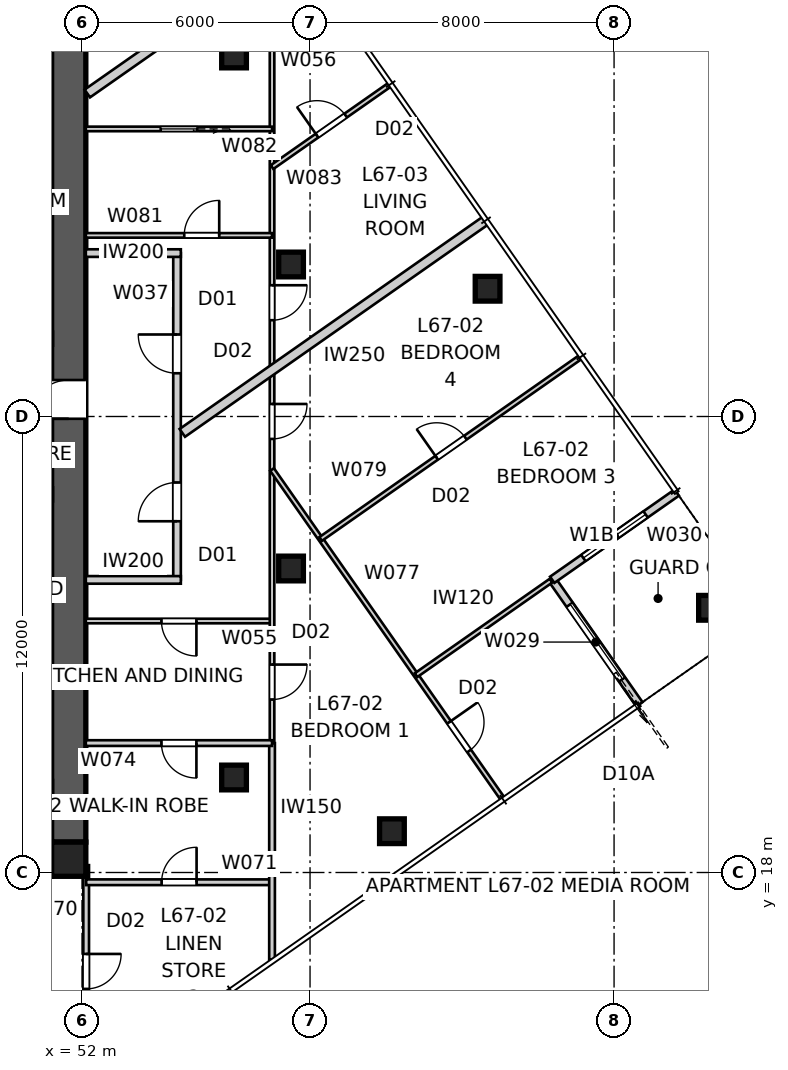
"""IFC4 building model, lengths in metres.
Left out: names, types, materials, properties, quantities, classifications, styles, units other than length and angle.
Written with IfcOpenShell. Run it as: python <this file> out.ifc"""

import sys

from ifc_helpers import new_model, si_unit, direction, frame, frame_2d, origin, origin_2d, place, context, subcontext, project, spatial, polyline, rectangle, outline, extrude, element, fill, save


model = new_model("IFC4")
c1 = context("Model", 3, precision=1e-05, world=origin(), true_north=direction((0.0, 1.0)))
c2 = subcontext(c1, "Body", "Model", "MODEL_VIEW")
j1 = project(units=[si_unit("LENGTHUNIT", "METRE"), si_unit("PLANEANGLEUNIT", "RADIAN")], contexts=[c1])
p1 = place(None, origin())
s1 = spatial("IfcSite", under=j1, at=p1, CompositionType="ELEMENT")
p2 = place(p1, origin())
s2 = spatial("IfcBuilding", under=s1, at=p2, CompositionType="ELEMENT")
p3 = place(p2, frame((0.0, 0.0, 243.8)))
s3 = spatial("IfcBuildingStorey", under=s2, at=p3, CompositionType="ELEMENT", Elevation=243.8)
p4 = place(p3, frame((51.2, 18.35, 0.0), z_axis=(0.0, 0.0, 1.0), x_axis=(-1.0, 0.0, 0.0)))
e1 = element("IfcWall", 1, at=p4, inside=s3, PredefinedType="SHEAR", context=c2, shape_type="SweptSolid", body=[
    extrude(outline(polyline([(0.0, -0.45), (22.4, -0.45), (22.4, -0.025), (22.85, -0.025), (22.85, 0.025), (22.4, 0.025), (22.4, 0.45), (0.0, 0.45), (0.0, 0.025), (-0.45, 0.025), (-0.45, -0.025), (0.0, -0.025), (0.0, -0.45)])), origin(), (0.0, 0.0, 1.0), 3.4),
])
p5 = place(p3, frame((51.65, 18.8, 0.0), z_axis=(0.0, 0.0, 1.0), x_axis=(0.0, 1.0, 0.0)))
e2 = element("IfcWall", 2, at=p5, inside=s3, PredefinedType="SHEAR", context=c2, shape_type="SweptSolid", body=[
    extrude(outline(polyline([(0.0, -0.45), (22.4, -0.45), (22.4, -0.025), (22.85, -0.025), (22.85, 0.025), (22.4, 0.025), (22.4, 0.45), (0.0, 0.45), (0.0, 0.025), (-0.45, 0.025), (-0.45, -0.025), (0.0, -0.025), (0.0, -0.45)])), origin(), (0.0, 0.0, 1.0), 3.4),
])
p6 = place(p5, frame((11.14, 0.0, 0.0)))
e3 = element("IfcOpeningElement", 3, at=p6, cuts=e2, PredefinedType="OPENING", context=c2, shape_type="SweptSolid", body=[
    extrude(rectangle(XDim=1.02, YDim=2.4, at=frame_2d((0.51, 1.2))), frame((0.0, 0.46, 0.0), z_axis=(0.0, -1.0, 0.0), x_axis=(1.0, 0.0, 0.0)), (0.0, 0.0, 1.0), 0.92),
])
p7 = place(p3, frame((51.65, 18.35, 0.0), z_axis=(0.0, 0.0, 1.0), x_axis=(1.0, 0.0, 0.0)))
e4 = element("IfcColumn", 4, at=p7, inside=s3, PredefinedType="COLUMN", context=c2, shape_type="SweptSolid", body=[
    extrude(rectangle(XDim=0.9, YDim=0.9, at=origin_2d()), origin(), (0.0, 0.0, 1.0), 3.4),
])
for number, where, z_axis, x_axis in (
    (5, (60.155, 19.086, 0.0), (0.0, 0.0, 1.0), (1.0, 0.0, 0.0)),
    (6, (68.551, 24.966, 0.0), (0.0, 0.0, 1.0), (1.0, 0.0, 0.0)),
    (7, (62.672, 33.362, 0.0), (0.0, 0.0, 1.0), (1.0, 0.0, 0.0)),
    (8, (57.5, 26.0, 0.0), (0.0, 0.0, 1.0), (1.0, 0.0, 0.0)),
    (9, (57.5, 34.0, 0.0), (0.0, 0.0, 1.0), (1.0, 0.0, 0.0)),
    (10, (56.0, 39.5, 0.0), (0.0, 0.0, 1.0), (1.0, 0.0, 0.0)),
    (11, (56.0, 20.5, 0.0), (0.0, 0.0, 1.0), (1.0, 0.0, 0.0)),
):
    element("IfcColumn", number, at=place(p3, frame(where, z_axis=z_axis, x_axis=x_axis)), inside=s3, PredefinedType="COLUMN", context=c2, shape_type="SweptSolid", body=[
        extrude(rectangle(XDim=0.65, YDim=0.65, at=origin_2d()), origin(), (0.0, 0.0, 1.0), 3.4),
    ])
p8 = place(p3, frame((66.667, 22.426, 0.0), z_axis=(0.0, 0.0, 1.0), x_axis=(-0.573556557423, 0.819165963305, 0.0)))
e12 = element("IfcWall", 12, at=p8, inside=s3, PredefinedType="SOLIDWALL", context=c2, shape_type="SweptSolid", body=[
    extrude(rectangle(XDim=4.0, YDim=0.2, at=frame_2d((2.0, 0.0))), origin(), (0.0, 0.0, 1.0), 3.25),
])
p9 = place(p8, frame((0.8, 0.0, 0.0)))
e13 = element("IfcOpeningElement", 13, at=p9, cuts=e12, PredefinedType="OPENING", context=c2, shape_type="SweptSolid", body=[
    extrude(rectangle(XDim=2.4, YDim=2.1, at=frame_2d((1.2, 1.05))), frame((0.0, 0.11, 0.0), z_axis=(0.0, -1.0, 0.0), x_axis=(1.0, 0.0, 0.0)), (0.0, 0.0, 1.0), 0.22),
])
p10 = place(p3, frame((64.373, 25.702, 0.0), z_axis=(0.0, 0.0, 1.0), x_axis=(0.819137286189, 0.573597512525, 0.0)))
e14 = element("IfcWall", 14, at=p10, inside=s3, PredefinedType="SOLIDWALL", context=c2, shape_type="SweptSolid", body=[
    extrude(rectangle(XDim=4.0, YDim=0.2, at=frame_2d((2.0, 0.0))), origin(), (0.0, 0.0, 1.0), 3.25),
])
p11 = place(p10, frame((1.0, 0.0, 0.45)))
e15 = element("IfcOpeningElement", 15, at=p11, cuts=e14, PredefinedType="OPENING", context=c2, shape_type="SweptSolid", body=[
    extrude(rectangle(XDim=2.0, YDim=1.8, at=frame_2d((1.0, 0.9))), frame((0.0, 0.11, 0.0), z_axis=(0.0, -1.0, 0.0), x_axis=(1.0, 0.0, 0.0)), (0.0, 0.0, 1.0), 0.22),
])
p12 = place(p3, frame((54.5, 25.7, 0.0), z_axis=(0.0, 0.0, 1.0), x_axis=(0.0, 1.0, 0.0)))
e16 = element("IfcWall", 16, at=p12, inside=s3, PredefinedType="PARTITIONING", context=c2, shape_type="SweptSolid", body=[
    extrude(rectangle(XDim=8.6, YDim=0.2, at=frame_2d((4.3, 0.0))), origin(), (0.0, 0.0, 1.0), 3.25),
])
p13 = place(p12, frame((5.438, 0.0, 0.0)))
e17 = element("IfcOpeningElement", 17, at=p13, cuts=e16, PredefinedType="OPENING", context=c2, shape_type="SweptSolid", body=[
    extrude(rectangle(XDim=1.02, YDim=2.34, at=frame_2d((0.51, 1.17))), frame((0.0, 0.11, 0.0), z_axis=(0.0, -1.0, 0.0), x_axis=(1.0, 0.0, 0.0)), (0.0, 0.0, 1.0), 0.22),
])
p14 = place(p12, frame((1.543, 0.0, 0.0)))
e18 = element("IfcOpeningElement", 18, at=p14, cuts=e16, PredefinedType="OPENING", context=c2, shape_type="SweptSolid", body=[
    extrude(rectangle(XDim=1.02, YDim=2.34, at=frame_2d((0.51, 1.17))), frame((0.0, 0.11, 0.0), z_axis=(0.0, -1.0, 0.0), x_axis=(1.0, 0.0, 0.0)), (0.0, 0.0, 1.0), 0.22),
])
for number, where, z_axis, x_axis in (
    (19, (52.1, 34.3, 0.0), (0.0, 0.0, 1.0), (1.0, 0.0, 0.0)),
    (20, (52.1, 25.7, 0.0), (0.0, 0.0, 1.0), (1.0, 0.0, 0.0)),
):
    element("IfcWall", number, at=place(p3, frame(where, z_axis=z_axis, x_axis=x_axis)), inside=s3, PredefinedType="PARTITIONING", context=c2, shape_type="SweptSolid", body=[
        extrude(rectangle(XDim=2.5, YDim=0.2, at=frame_2d((1.25, 0.0))), origin(), (0.0, 0.0, 1.0), 3.25),
    ])
p15 = place(p3, frame((57.612, 42.332, 0.0), z_axis=(0.0, 0.0, 1.0), x_axis=(-0.819161528122, -0.573562891796, 0.0)))
e21 = element("IfcWall", 21, at=p15, inside=s3, PredefinedType="PARTITIONING", context=c2, shape_type="SweptSolid", body=[
    extrude(rectangle(XDim=6.681, YDim=0.25, at=frame_2d((3.341, 0.0))), origin(), (0.0, 0.0, 1.0), 3.25),
])
p16 = place(p3, frame((62.631, 35.164, 0.0), z_axis=(0.0, 0.0, 1.0), x_axis=(-0.81915902312, -0.573566469418, 0.0)))
e22 = element("IfcWall", 22, at=p16, inside=s3, PredefinedType="PARTITIONING", context=c2, shape_type="SweptSolid", body=[
    extrude(rectangle(XDim=9.756, YDim=0.25, at=frame_2d((4.878, 0.0))), origin(), (0.0, 0.0, 1.0), 3.25),
])
p17 = place(p3, frame((57.0, 24.618, 0.0), z_axis=(0.0, 0.0, 1.0), x_axis=(-1.0, 0.0, 0.0)))
e23 = element("IfcWall", 23, at=p17, inside=s3, PredefinedType="PARTITIONING", context=c2, shape_type="SweptSolid", body=[
    extrude(rectangle(XDim=4.9, YDim=0.12, at=frame_2d((2.45, 0.0))), origin(), (0.0, 0.0, 1.0), 3.25),
])
p18 = place(p17, frame((1.99, 0.0, 0.0)))
e24 = element("IfcOpeningElement", 24, at=p18, cuts=e23, PredefinedType="OPENING", context=c2, shape_type="SweptSolid", body=[
    extrude(rectangle(XDim=0.92, YDim=2.34, at=frame_2d((0.46, 1.17))), frame((0.0, 0.07, 0.0), z_axis=(0.0, -1.0, 0.0), x_axis=(1.0, 0.0, 0.0)), (0.0, 0.0, 1.0), 0.14),
])
p19 = place(p3, frame((57.0, 41.904, 0.0), z_axis=(0.0, 0.0, 1.0), x_axis=(0.0, -1.0, 0.0)))
e25 = element("IfcWall", 25, at=p19, inside=s3, PredefinedType="PARTITIONING", context=c2, shape_type="SweptSolid", body=[
    extrude(rectangle(XDim=20.498, YDim=0.12, at=frame_2d((10.249, 0.0))), origin(), (0.0, 0.0, 1.0), 2.55),
])
p20 = place(p19, frame((8.449, 0.0, 0.0)))
e26 = element("IfcOpeningElement", 26, at=p20, cuts=e25, PredefinedType="OPENING", context=c2, shape_type="SweptSolid", body=[
    extrude(rectangle(XDim=0.92, YDim=2.34, at=frame_2d((0.46, 1.17))), frame((0.0, 0.07, 0.0), z_axis=(0.0, -1.0, 0.0), x_axis=(1.0, 0.0, 0.0)), (0.0, 0.0, 1.0), 0.14),
])
p21 = place(p19, frame((11.574, 0.0, 0.0)))
e27 = element("IfcOpeningElement", 27, at=p21, cuts=e25, PredefinedType="OPENING", context=c2, shape_type="SweptSolid", body=[
    extrude(rectangle(XDim=0.92, YDim=2.34, at=frame_2d((0.46, 1.17))), frame((0.0, 0.07, 0.0), z_axis=(0.0, -1.0, 0.0), x_axis=(1.0, 0.0, 0.0)), (0.0, 0.0, 1.0), 0.14),
])
p22 = place(p19, frame((18.432, 0.0, 0.0)))
e28 = element("IfcOpeningElement", 28, at=p22, cuts=e25, PredefinedType="OPENING", context=c2, shape_type="SweptSolid", body=[
    extrude(rectangle(XDim=0.92, YDim=2.34, at=frame_2d((0.46, 1.17))), frame((0.0, 0.07, 0.0), z_axis=(0.0, -1.0, 0.0), x_axis=(1.0, 0.0, 0.0)), (0.0, 0.0, 1.0), 0.14),
])
p23 = place(p3, frame((52.109, 18.194, 0.0), z_axis=(0.0, 0.0, 1.0), x_axis=(0.0, -1.0, 0.0)))
e29 = element("IfcWall", 29, at=p23, inside=s3, PredefinedType="SOLIDWALL", context=c2, shape_type="SweptSolid", body=[
    extrude(rectangle(XDim=5.194, YDim=0.15, at=frame_2d((2.597, 0.0))), origin(), (0.0, 0.0, 1.0), 3.25),
])
p24 = place(p23, frame((2.337, 0.0, 0.0)))
e30 = element("IfcOpeningElement", 30, at=p24, cuts=e29, PredefinedType="OPENING", context=c2, shape_type="SweptSolid", body=[
    extrude(rectangle(XDim=0.92, YDim=2.34, at=frame_2d((0.46, 1.17))), frame((0.0, 0.085, 0.0), z_axis=(0.0, -1.0, 0.0), x_axis=(1.0, 0.0, 0.0)), (0.0, 0.0, 1.0), 0.17),
])
p25 = place(p3, frame((52.109, 17.743, 0.0), z_axis=(0.0, 0.0, 1.0), x_axis=(1.0, 0.0, 0.0)))
e31 = element("IfcWall", 31, at=p25, inside=s3, PredefinedType="SOLIDWALL", context=c2, shape_type="SweptSolid", body=[
    extrude(rectangle(XDim=4.891, YDim=0.15, at=frame_2d((2.446, 0.0))), origin(), (0.0, 0.0, 1.0), 3.25),
])
p26 = place(p25, frame((1.986, 0.0, 0.0)))
e32 = element("IfcOpeningElement", 32, at=p26, cuts=e31, PredefinedType="OPENING", context=c2, shape_type="SweptSolid", body=[
    extrude(rectangle(XDim=0.92, YDim=2.34, at=frame_2d((0.46, 1.17))), frame((0.0, 0.085, 0.0), z_axis=(0.0, -1.0, 0.0), x_axis=(1.0, 0.0, 0.0)), (0.0, 0.0, 1.0), 0.17),
])
p27 = place(p3, frame((57.0, 21.406, 0.0), z_axis=(0.0, 0.0, 1.0), x_axis=(0.0, -1.0, 0.0)))
e33 = element("IfcWall", 33, at=p27, inside=s3, PredefinedType="SOLIDWALL", context=c2, shape_type="SweptSolid", body=[
    extrude(rectangle(XDim=5.7, YDim=0.15, at=frame_2d((2.85, 0.0))), origin(), (0.0, 0.0, 1.0), 3.25),
])
p28 = place(p3, frame((57.0, 21.406, 0.0), z_axis=(0.0, 0.0, 1.0), x_axis=(-1.0, 0.0, 0.0)))
e34 = element("IfcWall", 34, at=p28, inside=s3, PredefinedType="SOLIDWALL", context=c2, shape_type="SweptSolid", body=[
    extrude(rectangle(XDim=4.9, YDim=0.15, at=frame_2d((2.45, 0.0))), origin(), (0.0, 0.0, 1.0), 3.25),
])
p29 = place(p28, frame((1.99, 0.0, 0.0)))
e35 = element("IfcOpeningElement", 35, at=p29, cuts=e34, PredefinedType="OPENING", context=c2, shape_type="SweptSolid", body=[
    extrude(rectangle(XDim=0.92, YDim=2.34, at=frame_2d((0.46, 1.17))), frame((0.0, 0.085, 0.0), z_axis=(0.0, -1.0, 0.0), x_axis=(1.0, 0.0, 0.0)), (0.0, 0.0, 1.0), 0.17),
])
p30 = place(p3, frame((57.0, 28.604, 0.0), z_axis=(0.0, 0.0, 1.0), x_axis=(0.573575545802, -0.819152667857, 0.0)))
e36 = element("IfcWall", 36, at=p30, inside=s3, PredefinedType="PARTITIONING", context=c2, shape_type="SweptSolid", body=[
    extrude(rectangle(XDim=10.566, YDim=0.12, at=frame_2d((5.283, 0.0))), origin(), (0.0, 0.0, 1.0), 3.25),
])
p31 = place(p30, frame((8.121, 0.0, 0.0)))
e37 = element("IfcOpeningElement", 37, at=p31, cuts=e36, PredefinedType="OPENING", context=c2, shape_type="SweptSolid", body=[
    extrude(rectangle(XDim=0.92, YDim=2.34, at=frame_2d((0.46, 1.17))), frame((0.0, 0.07, 0.0), z_axis=(0.0, -1.0, 0.0), x_axis=(1.0, 0.0, 0.0)), (0.0, 0.0, 1.0), 0.14),
])
p32 = place(p3, frame((58.28, 26.777, 0.0), z_axis=(0.0, 0.0, 1.0), x_axis=(0.819152099525, 0.573576357466, 0.0)))
e38 = element("IfcWall", 38, at=p32, inside=s3, PredefinedType="PARTITIONING", context=c2, shape_type="SweptSolid", body=[
    extrude(rectangle(XDim=8.335, YDim=0.12, at=frame_2d((4.167, 0.0))), origin(), (0.0, 0.0, 1.0), 3.25),
])
p33 = place(p32, frame((3.728, 0.0, 0.0)))
e39 = element("IfcOpeningElement", 39, at=p33, cuts=e38, PredefinedType="OPENING", context=c2, shape_type="SweptSolid", body=[
    extrude(rectangle(XDim=0.92, YDim=2.34, at=frame_2d((0.46, 1.17))), frame((0.0, 0.07, 0.0), z_axis=(0.0, -1.0, 0.0), x_axis=(1.0, 0.0, 0.0)), (0.0, 0.0, 1.0), 0.14),
])
p34 = place(p3, frame((64.34, 25.679, 0.0), z_axis=(0.0, 0.0, 1.0), x_axis=(-0.819165768115, -0.573556836197, 0.0)))
e40 = element("IfcWall", 40, at=p34, inside=s3, PredefinedType="PARTITIONING", context=c2, shape_type="SweptSolid", body=[
    extrude(rectangle(XDim=4.335, YDim=0.12, at=frame_2d((2.167, 0.0))), origin(), (0.0, 0.0, 1.0), 3.25),
])
p35 = place(p3, frame((52.1, 34.766, 0.0), z_axis=(0.0, 0.0, 1.0), x_axis=(1.0, 0.0, 0.0)))
e41 = element("IfcWall", 41, at=p35, inside=s3, PredefinedType="PARTITIONING", context=c2, shape_type="SweptSolid", body=[
    extrude(rectangle(XDim=4.9, YDim=0.12, at=frame_2d((2.45, 0.0))), origin(), (0.0, 0.0, 1.0), 3.25),
])
p36 = place(p35, frame((2.59, 0.0, 0.0)))
e42 = element("IfcOpeningElement", 42, at=p36, cuts=e41, PredefinedType="OPENING", context=c2, shape_type="SweptSolid", body=[
    extrude(rectangle(XDim=0.92, YDim=2.34, at=frame_2d((0.46, 1.17))), frame((0.0, 0.07, 0.0), z_axis=(0.0, -1.0, 0.0), x_axis=(1.0, 0.0, 0.0)), (0.0, 0.0, 1.0), 0.14),
])
p37 = place(p3, frame((57.0, 37.568, 0.0), z_axis=(0.0, 0.0, 1.0), x_axis=(-1.0, 0.0, 0.0)))
e43 = element("IfcWall", 43, at=p37, inside=s3, PredefinedType="PARTITIONING", context=c2, shape_type="SweptSolid", body=[
    extrude(rectangle(XDim=4.9, YDim=0.12, at=frame_2d((2.45, 0.0))), origin(), (0.0, 0.0, 1.0), 3.25),
])
p38 = place(p37, frame((1.97, 0.0, 0.0)))
e44 = element("IfcOpeningElement", 44, at=p38, cuts=e43, PredefinedType="OPENING", context=c2, shape_type="SweptSolid", body=[
    extrude(rectangle(XDim=0.96, YDim=2.1, at=frame_2d((0.48, 1.05))), frame((0.0, 0.07, 0.0), z_axis=(0.0, -1.0, 0.0), x_axis=(1.0, 0.0, 0.0)), (0.0, 0.0, 1.0), 0.14),
])
p39 = place(p3, frame((57.0, 36.562, 0.0), z_axis=(0.0, 0.0, 1.0), x_axis=(0.819140645834, 0.573592714688, 0.0)))
e45 = element("IfcWall", 45, at=p39, inside=s3, PredefinedType="PARTITIONING", context=c2, shape_type="SweptSolid", body=[
    extrude(rectangle(XDim=3.77, YDim=0.12, at=frame_2d((1.885, 0.0))), origin(), (0.0, 0.0, 1.0), 3.25),
])
p40 = place(p39, frame((1.445, 0.0, 0.0)))
e46 = element("IfcOpeningElement", 46, at=p40, cuts=e45, PredefinedType="OPENING", context=c2, shape_type="SweptSolid", body=[
    extrude(rectangle(XDim=0.92, YDim=2.34, at=frame_2d((0.46, 1.17))), frame((0.0, 0.07, 0.0), z_axis=(0.0, -1.0, 0.0), x_axis=(1.0, 0.0, 0.0)), (0.0, 0.0, 1.0), 0.14),
])
p41 = place(p9, origin())
e47 = element("IfcDoor", 47, at=p41, inside=s3, OperationType="SLIDING_TO_LEFT", PredefinedType="DOOR", context=c2, shape_type="SweptSolid", body=[
    extrude(rectangle(XDim=2.4, YDim=2.1, at=frame_2d((1.2, 1.05))), frame((0.0, 0.025, 0.0), z_axis=(0.0, -1.0, 0.0), x_axis=(1.0, 0.0, 0.0)), (0.0, 0.0, 1.0), 0.05),
])
fill(e13, e47)
p42 = place(p11, origin())
e48 = element("IfcWindow", 48, at=p42, inside=s3, PartitioningType="SINGLE_PANEL", PredefinedType="WINDOW", context=c2, shape_type="SweptSolid", body=[
    extrude(rectangle(XDim=2.0, YDim=1.8, at=frame_2d((1.0, 0.9))), frame((0.0, 0.03, 0.0), z_axis=(0.0, -1.0, 0.0), x_axis=(1.0, 0.0, 0.0)), (0.0, 0.0, 1.0), 0.06),
])
fill(e15, e48)
p43 = place(p13, origin())
e49 = element("IfcDoor", 49, at=p43, inside=s3, OperationType="SINGLE_SWING_RIGHT", PredefinedType="DOOR", context=c2, shape_type="SweptSolid", body=[
    extrude(rectangle(XDim=1.02, YDim=2.34, at=frame_2d((0.51, 1.17))), frame((0.0, 0.025, 0.0), z_axis=(0.0, -1.0, 0.0), x_axis=(1.0, 0.0, 0.0)), (0.0, 0.0, 1.0), 0.05),
])
fill(e17, e49)
p44 = place(p14, origin())
e50 = element("IfcDoor", 50, at=p44, inside=s3, OperationType="SINGLE_SWING_LEFT", PredefinedType="DOOR", context=c2, shape_type="SweptSolid", body=[
    extrude(rectangle(XDim=1.02, YDim=2.34, at=frame_2d((0.51, 1.17))), frame((0.0, 0.025, 0.0), z_axis=(0.0, -1.0, 0.0), x_axis=(1.0, 0.0, 0.0)), (0.0, 0.0, 1.0), 0.05),
])
fill(e18, e50)
p45 = place(p36, origin())
e51 = element("IfcDoor", 51, at=p45, inside=s3, OperationType="SINGLE_SWING_RIGHT", PredefinedType="DOOR", context=c2, shape_type="SweptSolid", body=[
    extrude(rectangle(XDim=0.92, YDim=2.34, at=frame_2d((0.46, 1.17))), frame((0.0, 0.025, 0.0), z_axis=(0.0, -1.0, 0.0), x_axis=(1.0, 0.0, 0.0)), (0.0, 0.0, 1.0), 0.05),
])
fill(e42, e51)
p46 = place(p20, origin())
e52 = element("IfcDoor", 52, at=p46, inside=s3, OperationType="SINGLE_SWING_LEFT", PredefinedType="DOOR", context=c2, shape_type="SweptSolid", body=[
    extrude(rectangle(XDim=0.92, YDim=2.34, at=frame_2d((0.46, 1.17))), frame((0.0, 0.025, 0.0), z_axis=(0.0, -1.0, 0.0), x_axis=(1.0, 0.0, 0.0)), (0.0, 0.0, 1.0), 0.05),
])
fill(e26, e52)
p47 = place(p18, origin())
e53 = element("IfcDoor", 53, at=p47, inside=s3, OperationType="SINGLE_SWING_LEFT", PredefinedType="DOOR", context=c2, shape_type="SweptSolid", body=[
    extrude(rectangle(XDim=0.92, YDim=2.34, at=frame_2d((0.46, 1.17))), frame((0.0, 0.025, 0.0), z_axis=(0.0, -1.0, 0.0), x_axis=(1.0, 0.0, 0.0)), (0.0, 0.0, 1.0), 0.05),
])
fill(e24, e53)
p48 = place(p21, origin())
e54 = element("IfcDoor", 54, at=p48, inside=s3, OperationType="SINGLE_SWING_LEFT", PredefinedType="DOOR", context=c2, shape_type="SweptSolid", body=[
    extrude(rectangle(XDim=0.92, YDim=2.34, at=frame_2d((0.46, 1.17))), frame((0.0, 0.025, 0.0), z_axis=(0.0, -1.0, 0.0), x_axis=(1.0, 0.0, 0.0)), (0.0, 0.0, 1.0), 0.05),
])
fill(e27, e54)
p49 = place(p38, origin())
e55 = element("IfcDoor", 55, at=p49, inside=s3, OperationType="SLIDING_TO_LEFT", PredefinedType="DOOR", context=c2, shape_type="SweptSolid", body=[
    extrude(rectangle(XDim=0.96, YDim=2.1, at=frame_2d((0.48, 1.05))), frame((0.0, 0.025, 0.0), z_axis=(0.0, -1.0, 0.0), x_axis=(1.0, 0.0, 0.0)), (0.0, 0.0, 1.0), 0.05),
])
fill(e44, e55)
p50 = place(p40, origin())
e56 = element("IfcDoor", 56, at=p50, inside=s3, OperationType="SINGLE_SWING_LEFT", PredefinedType="DOOR", context=c2, shape_type="SweptSolid", body=[
    extrude(rectangle(XDim=0.92, YDim=2.34, at=frame_2d((0.46, 1.17))), frame((0.0, 0.025, 0.0), z_axis=(0.0, -1.0, 0.0), x_axis=(1.0, 0.0, 0.0)), (0.0, 0.0, 1.0), 0.05),
])
fill(e46, e56)
p51 = place(p29, origin())
e57 = element("IfcDoor", 57, at=p51, inside=s3, OperationType="SINGLE_SWING_LEFT", PredefinedType="DOOR", context=c2, shape_type="SweptSolid", body=[
    extrude(rectangle(XDim=0.92, YDim=2.34, at=frame_2d((0.46, 1.17))), frame((0.0, 0.025, 0.0), z_axis=(0.0, -1.0, 0.0), x_axis=(1.0, 0.0, 0.0)), (0.0, 0.0, 1.0), 0.05),
])
fill(e35, e57)
p52 = place(p22, origin())
e58 = element("IfcDoor", 58, at=p52, inside=s3, OperationType="SINGLE_SWING_LEFT", PredefinedType="DOOR", context=c2, shape_type="SweptSolid", body=[
    extrude(rectangle(XDim=0.92, YDim=2.34, at=frame_2d((0.46, 1.17))), frame((0.0, 0.025, 0.0), z_axis=(0.0, -1.0, 0.0), x_axis=(1.0, 0.0, 0.0)), (0.0, 0.0, 1.0), 0.05),
])
fill(e28, e58)
p53 = place(p26, origin())
e59 = element("IfcDoor", 59, at=p53, inside=s3, OperationType="SINGLE_SWING_RIGHT", PredefinedType="DOOR", context=c2, shape_type="SweptSolid", body=[
    extrude(rectangle(XDim=0.92, YDim=2.34, at=frame_2d((0.46, 1.17))), frame((0.0, 0.025, 0.0), z_axis=(0.0, -1.0, 0.0), x_axis=(1.0, 0.0, 0.0)), (0.0, 0.0, 1.0), 0.05),
])
fill(e32, e59)
p54 = place(p24, origin())
e60 = element("IfcDoor", 60, at=p54, inside=s3, OperationType="SINGLE_SWING_LEFT", PredefinedType="DOOR", context=c2, shape_type="SweptSolid", body=[
    extrude(rectangle(XDim=0.92, YDim=2.34, at=frame_2d((0.46, 1.17))), frame((0.0, 0.025, 0.0), z_axis=(0.0, -1.0, 0.0), x_axis=(1.0, 0.0, 0.0)), (0.0, 0.0, 1.0), 0.05),
])
fill(e30, e60)
p55 = place(p33, origin())
e61 = element("IfcDoor", 61, at=p55, inside=s3, OperationType="SINGLE_SWING_LEFT", PredefinedType="DOOR", context=c2, shape_type="SweptSolid", body=[
    extrude(rectangle(XDim=0.92, YDim=2.34, at=frame_2d((0.46, 1.17))), frame((0.0, 0.025, 0.0), z_axis=(0.0, -1.0, 0.0), x_axis=(1.0, 0.0, 0.0)), (0.0, 0.0, 1.0), 0.05),
])
fill(e39, e61)
p56 = place(p31, origin())
e62 = element("IfcDoor", 62, at=p56, inside=s3, OperationType="SINGLE_SWING_LEFT", PredefinedType="DOOR", context=c2, shape_type="SweptSolid", body=[
    extrude(rectangle(XDim=0.92, YDim=2.34, at=frame_2d((0.46, 1.17))), frame((0.0, 0.025, 0.0), z_axis=(0.0, -1.0, 0.0), x_axis=(1.0, 0.0, 0.0)), (0.0, 0.0, 1.0), 0.05),
])
fill(e37, e62)
p57 = place(p6, origin())
e63 = element("IfcDoor", 63, at=p57, inside=s3, OperationType="SINGLE_SWING_LEFT", PredefinedType="DOOR", context=c2, shape_type="SweptSolid", body=[
    extrude(rectangle(XDim=1.02, YDim=2.4, at=frame_2d((0.51, 1.2))), frame((0.0, 0.025, 0.0), z_axis=(0.0, -1.0, 0.0), x_axis=(1.0, 0.0, 0.0)), (0.0, 0.0, 1.0), 0.05),
])
fill(e3, e63)
save(model, sys.argv[1])
